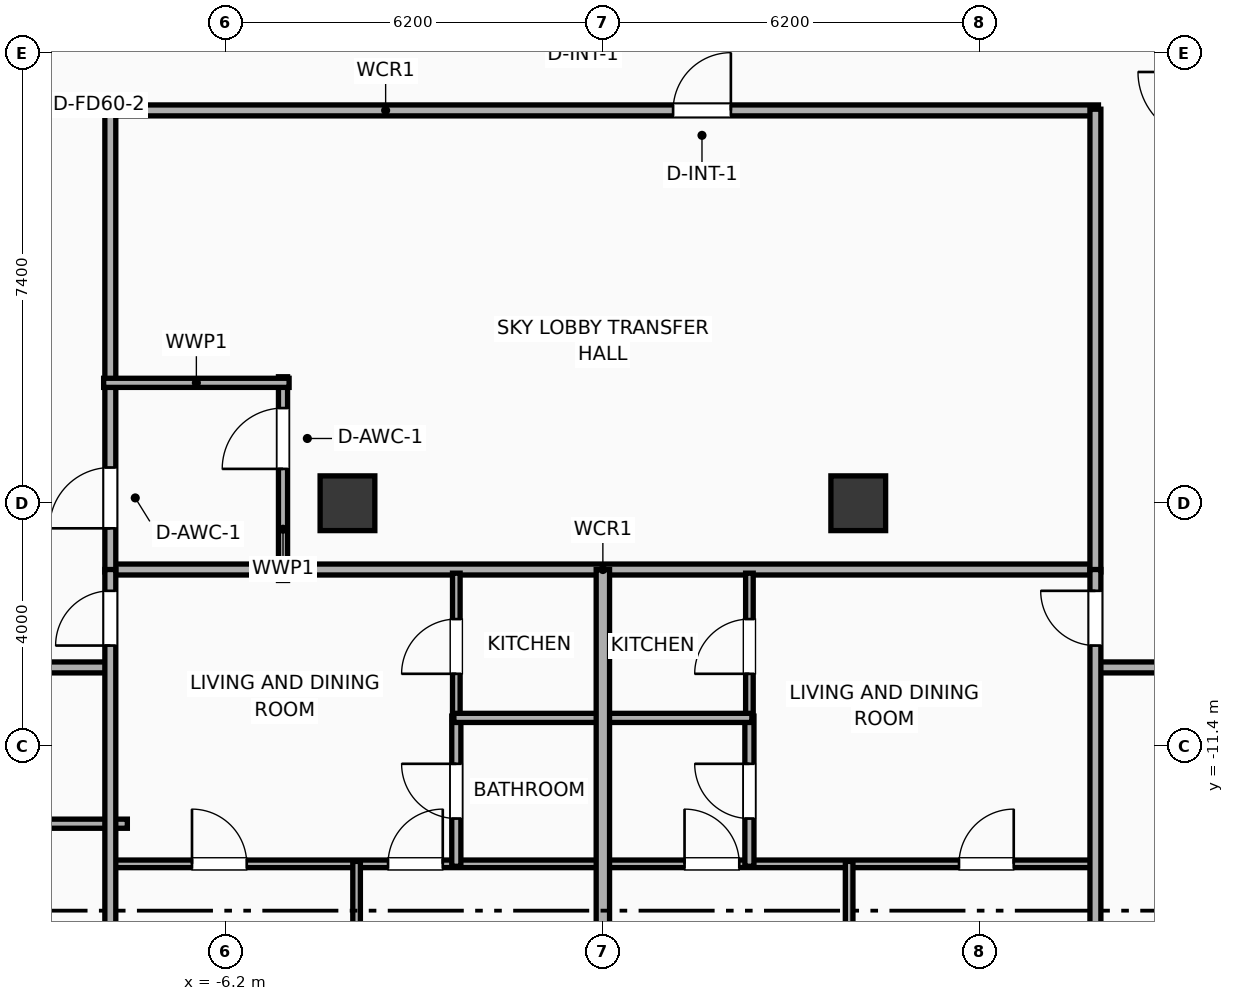
"""IFC4 building model, lengths in metres.
Left out: names, types, materials, properties, quantities, classifications, styles, units other than length and angle.
Written with IfcOpenShell. Run it as: python <this file> out.ifc"""

import sys

from ifc_helpers import new_model, si_unit, direction, frame, frame_2d, origin, origin_2d, place, context, subcontext, project, spatial, rectangle, extrude, element, fill, save


model = new_model("IFC4")
c1 = context("Model", 3, precision=1e-05, world=origin(), true_north=direction((0.0, 1.0)))
c2 = subcontext(c1, "Body", "Model", "MODEL_VIEW")
j1 = project(units=[si_unit("LENGTHUNIT", "METRE"), si_unit("PLANEANGLEUNIT", "RADIAN")], contexts=[c1])
p1 = place(None, origin())
s1 = spatial("IfcSite", under=j1, at=p1, CompositionType="ELEMENT")
p2 = place(p1, origin())
s2 = spatial("IfcBuilding", under=s1, at=p2, CompositionType="ELEMENT")
p3 = place(p2, frame((0.0, 0.0, 200.2)))
s3 = spatial("IfcBuildingStorey", under=s2, at=p3, CompositionType="ELEMENT", Elevation=200.2)
for number, where, z_axis, x_axis in (
    (1, (-4.2, -7.4, 0.0), (0.0, 0.0, 1.0), (1.0, 0.0, 0.0)),
    (2, (4.2, -7.4, 0.0), (0.0, 0.0, 1.0), (1.0, 0.0, 0.0)),
):
    element("IfcColumn", number, at=place(p3, frame(where, z_axis=z_axis, x_axis=x_axis)), inside=s3, PredefinedType="COLUMN", context=c2, shape_type="SweptSolid", body=[
        extrude(rectangle(XDim=0.9, YDim=0.9, at=origin_2d()), origin(), (0.0, 0.0, 1.0), 3.9),
    ])
p4 = place(p3, frame((-8.15, -8.49, 0.0), z_axis=(0.0, 0.0, 1.0), x_axis=(1.0, 0.0, 0.0)))
e3 = element("IfcWall", 3, at=p4, inside=s3, PredefinedType="PARTITIONING", context=c2, shape_type="SweptSolid", body=[
    extrude(rectangle(XDim=16.3, YDim=0.18, at=frame_2d((8.15, 0.0))), origin(), (0.0, 0.0, 1.0), 3.65),
])
p5 = place(p3, frame((-8.15, -0.94, 0.0), z_axis=(0.0, 0.0, 1.0), x_axis=(1.0, 0.0, 0.0)))
e4 = element("IfcWall", 4, at=p5, inside=s3, PredefinedType="PARTITIONING", context=c2, shape_type="SweptSolid", body=[
    extrude(rectangle(XDim=16.3, YDim=0.18, at=frame_2d((8.15, 0.0))), origin(), (0.0, 0.0, 1.0), 3.65),
])
p6 = place(p5, frame((9.305, 0.0, 0.0)))
e5 = element("IfcOpeningElement", 5, at=p6, cuts=e4, PredefinedType="OPENING", context=c2, shape_type="SweptSolid", body=[
    extrude(rectangle(XDim=0.95, YDim=2.05, at=frame_2d((0.475, 1.025))), frame((0.0, 0.1, 0.0), z_axis=(0.0, -1.0, 0.0), x_axis=(1.0, 0.0, 0.0)), (0.0, 0.0, 1.0), 0.2),
])
p7 = place(p3, frame((-8.1, -8.53, 0.0), z_axis=(0.0, 0.0, 1.0), x_axis=(0.0, 1.0, 0.0)))
e6 = element("IfcWall", 6, at=p7, inside=s3, PredefinedType="PARTITIONING", context=c2, shape_type="SweptSolid", body=[
    extrude(rectangle(XDim=7.61, YDim=0.18, at=frame_2d((3.805, 0.0))), origin(), (0.0, 0.0, 1.0), 3.65),
])
p8 = place(p7, frame((0.718, 0.0, 0.0)))
e7 = element("IfcOpeningElement", 7, at=p8, cuts=e6, PredefinedType="OPENING", context=c2, shape_type="SweptSolid", body=[
    extrude(rectangle(XDim=1.0, YDim=2.05, at=frame_2d((0.5, 1.025))), frame((0.0, 0.1, 0.0), z_axis=(0.0, -1.0, 0.0), x_axis=(1.0, 0.0, 0.0)), (0.0, 0.0, 1.0), 0.2),
])
p9 = place(p3, frame((8.1, -8.53, 0.0), z_axis=(0.0, 0.0, 1.0), x_axis=(0.0, 1.0, 0.0)))
e8 = element("IfcWall", 8, at=p9, inside=s3, PredefinedType="PARTITIONING", context=c2, shape_type="SweptSolid", body=[
    extrude(rectangle(XDim=7.61, YDim=0.18, at=frame_2d((3.805, 0.0))), origin(), (0.0, 0.0, 1.0), 3.65),
])
p10 = place(p3, frame((-5.26, -8.67, 0.0), z_axis=(0.0, 0.0, 1.0), x_axis=(0.0, 1.0, 0.0)))
e9 = element("IfcWall", 9, at=p10, inside=s3, PredefinedType="PLUMBINGWALL", context=c2, shape_type="SweptSolid", body=[
    extrude(rectangle(XDim=3.35, YDim=0.15, at=frame_2d((1.675, 0.0))), origin(), (0.0, 0.0, 1.0), 3.65),
])
p11 = place(p10, frame((1.835, 0.0, 0.0)))
e10 = element("IfcOpeningElement", 10, at=p11, cuts=e9, PredefinedType="OPENING", context=c2, shape_type="SweptSolid", body=[
    extrude(rectangle(XDim=1.0, YDim=2.05, at=frame_2d((0.5, 1.025))), frame((0.0, 0.085, 0.0), z_axis=(0.0, -1.0, 0.0), x_axis=(1.0, 0.0, 0.0)), (0.0, 0.0, 1.0), 0.17),
])
p12 = place(p3, frame((-8.21, -5.42, 0.0), z_axis=(0.0, 0.0, 1.0), x_axis=(1.0, 0.0, 0.0)))
e11 = element("IfcWall", 11, at=p12, inside=s3, PredefinedType="PLUMBINGWALL", context=c2, shape_type="SweptSolid", body=[
    extrude(rectangle(XDim=3.05, YDim=0.15, at=frame_2d((1.525, 0.0))), origin(), (0.0, 0.0, 1.0), 3.65),
])
p13 = place(p3, frame((-10.084, -12.67, 0.0), z_axis=(0.0, 0.0, 1.0), x_axis=(1.0, 0.0, 0.0)))
e12 = element("IfcWall", 12, at=p13, inside=s3, PredefinedType="PLUMBINGWALL", context=c2, shape_type="SweptSolid", body=[
    extrude(rectangle(XDim=2.264, YDim=0.15, at=frame_2d((1.132, 0.0))), origin(), (0.0, 0.0, 1.0), 3.65),
])
p14 = place(p3, frame((-19.5, -10.1, 0.0), z_axis=(0.0, 0.0, 1.0), x_axis=(1.0, 0.0, 0.0)))
e13 = element("IfcWall", 13, at=p14, inside=s3, PredefinedType="PARTITIONING", context=c2, shape_type="SweptSolid", body=[
    extrude(rectangle(XDim=11.42, YDim=0.18, at=frame_2d((5.71, 0.0))), origin(), (0.0, 0.0, 1.0), 3.65),
])
p15 = place(p14, frame((2.324, 0.0, 0.0)))
e14 = element("IfcOpeningElement", 14, at=p15, cuts=e13, PredefinedType="OPENING", context=c2, shape_type="SweptSolid", body=[
    extrude(rectangle(XDim=1.15, YDim=2.05, at=frame_2d((0.575, 1.025))), frame((0.0, 0.1, 0.0), z_axis=(0.0, -1.0, 0.0), x_axis=(1.0, 0.0, 0.0)), (0.0, 0.0, 1.0), 0.2),
])
p16 = place(p14, frame((8.323, 0.0, 0.0)))
e15 = element("IfcOpeningElement", 15, at=p16, cuts=e13, PredefinedType="OPENING", context=c2, shape_type="SweptSolid", body=[
    extrude(rectangle(XDim=0.9, YDim=2.05, at=frame_2d((0.45, 1.025))), frame((0.0, 0.1, 0.0), z_axis=(0.0, -1.0, 0.0), x_axis=(1.0, 0.0, 0.0)), (0.0, 0.0, 1.0), 0.2),
])
p17 = place(p3, frame((8.08, -10.1, 0.0), z_axis=(0.0, 0.0, 1.0), x_axis=(1.0, 0.0, 0.0)))
e16 = element("IfcWall", 16, at=p17, inside=s3, PredefinedType="PARTITIONING", context=c2, shape_type="SweptSolid", body=[
    extrude(rectangle(XDim=11.42, YDim=0.18, at=frame_2d((5.71, 0.0))), origin(), (0.0, 0.0, 1.0), 3.65),
])
p18 = place(p17, frame((1.175, 0.0, 0.0)))
e17 = element("IfcOpeningElement", 17, at=p18, cuts=e16, PredefinedType="OPENING", context=c2, shape_type="SweptSolid", body=[
    extrude(rectangle(XDim=1.15, YDim=2.05, at=frame_2d((0.575, 1.025))), frame((0.0, 0.1, 0.0), z_axis=(0.0, -1.0, 0.0), x_axis=(1.0, 0.0, 0.0)), (0.0, 0.0, 1.0), 0.2),
])
p19 = place(p17, frame((8.243, 0.0, 0.0)))
e18 = element("IfcOpeningElement", 18, at=p19, cuts=e16, PredefinedType="OPENING", context=c2, shape_type="SweptSolid", body=[
    extrude(rectangle(XDim=0.9, YDim=2.05, at=frame_2d((0.45, 1.025))), frame((0.0, 0.1, 0.0), z_axis=(0.0, -1.0, 0.0), x_axis=(1.0, 0.0, 0.0)), (0.0, 0.0, 1.0), 0.2),
])
p20 = place(p3, frame((-8.08, -13.33, 0.0), z_axis=(0.0, 0.0, 1.0), x_axis=(1.0, 0.0, 0.0)))
e19 = element("IfcWall", 19, at=p20, inside=s3, PredefinedType="PARTITIONING", context=c2, shape_type="SweptSolid", body=[
    extrude(rectangle(XDim=8.06, YDim=0.125, at=frame_2d((4.03, 0.0))), origin(), (0.0, 0.0, 1.0), 3.65),
])
p21 = place(p20, frame((1.323, 0.0, 0.0)))
e20 = element("IfcOpeningElement", 20, at=p21, cuts=e19, PredefinedType="OPENING", context=c2, shape_type="SweptSolid", body=[
    extrude(rectangle(XDim=0.9, YDim=2.05, at=frame_2d((0.45, 1.025))), frame((0.0, 0.073, 0.0), z_axis=(0.0, -1.0, 0.0), x_axis=(1.0, 0.0, 0.0)), (0.0, 0.0, 1.0), 0.145),
])
p22 = place(p20, frame((4.547, 0.0, 0.0)))
e21 = element("IfcOpeningElement", 21, at=p22, cuts=e19, PredefinedType="OPENING", context=c2, shape_type="SweptSolid", body=[
    extrude(rectangle(XDim=0.9, YDim=2.05, at=frame_2d((0.45, 1.025))), frame((0.0, 0.073, 0.0), z_axis=(0.0, -1.0, 0.0), x_axis=(1.0, 0.0, 0.0)), (0.0, 0.0, 1.0), 0.145),
])
p23 = place(p3, frame((-2.41, -10.96, 0.0), z_axis=(0.0, 0.0, 1.0), x_axis=(0.0, 1.0, 0.0)))
e22 = element("IfcWall", 22, at=p23, inside=s3, PredefinedType="PARTITIONING", context=c2, shape_type="SweptSolid", body=[
    extrude(rectangle(XDim=2.41, YDim=0.125, at=frame_2d((1.205, 0.0))), origin(), (0.0, 0.0, 1.0), 3.65),
])
p24 = place(p23, frame((0.755, 0.0, 0.0)))
e23 = element("IfcOpeningElement", 23, at=p24, cuts=e22, PredefinedType="OPENING", context=c2, shape_type="SweptSolid", body=[
    extrude(rectangle(XDim=0.9, YDim=2.05, at=frame_2d((0.45, 1.025))), frame((0.0, 0.073, 0.0), z_axis=(0.0, -1.0, 0.0), x_axis=(1.0, 0.0, 0.0)), (0.0, 0.0, 1.0), 0.145),
])
p25 = place(p3, frame((-2.41, -13.37, 0.0), z_axis=(0.0, 0.0, 1.0), x_axis=(0.0, 1.0, 0.0)))
e24 = element("IfcWall", 24, at=p25, inside=s3, PredefinedType="PLUMBINGWALL", context=c2, shape_type="SweptSolid", body=[
    extrude(rectangle(XDim=2.47, YDim=0.15, at=frame_2d((1.235, 0.0))), origin(), (0.0, 0.0, 1.0), 3.65),
])
p26 = place(p25, frame((0.785, 0.0, 0.0)))
e25 = element("IfcOpeningElement", 25, at=p26, cuts=e24, PredefinedType="OPENING", context=c2, shape_type="SweptSolid", body=[
    extrude(rectangle(XDim=0.9, YDim=2.05, at=frame_2d((0.45, 1.025))), frame((0.0, 0.085, 0.0), z_axis=(0.0, -1.0, 0.0), x_axis=(1.0, 0.0, 0.0)), (0.0, 0.0, 1.0), 0.17),
])
p27 = place(p3, frame((-2.45, -10.93, 0.0), z_axis=(0.0, 0.0, 1.0), x_axis=(1.0, 0.0, 0.0)))
e26 = element("IfcWall", 26, at=p27, inside=s3, PredefinedType="PLUMBINGWALL", context=c2, shape_type="SweptSolid", body=[
    extrude(rectangle(XDim=2.43, YDim=0.15, at=frame_2d((1.215, 0.0))), origin(), (0.0, 0.0, 1.0), 3.65),
])
p28 = place(p3, frame((-4.05, -18.83, 0.0), z_axis=(0.0, 0.0, 1.0), x_axis=(0.0, 1.0, 0.0)))
e27 = element("IfcWall", 27, at=p28, inside=s3, PredefinedType="PARTITIONING", context=c2, shape_type="SweptSolid", body=[
    extrude(rectangle(XDim=5.54, YDim=0.125, at=frame_2d((2.77, 0.0))), origin(), (0.0, 0.0, 1.0), 2.54),
])
p29 = place(p3, frame((-8.1, -18.83, 0.0), z_axis=(0.0, 0.0, 1.0), x_axis=(0.0, 1.0, 0.0)))
e28 = element("IfcWall", 28, at=p29, inside=s3, PredefinedType="PARTITIONING", context=c2, shape_type="SweptSolid", body=[
    extrude(rectangle(XDim=10.34, YDim=0.18, at=frame_2d((5.17, 0.0))), origin(), (0.0, 0.0, 1.0), 3.65),
])
p30 = place(p29, frame((9.09, 0.0, 0.0)))
e29 = element("IfcOpeningElement", 29, at=p30, cuts=e28, PredefinedType="OPENING", context=c2, shape_type="SweptSolid", body=[
    extrude(rectangle(XDim=0.9, YDim=2.05, at=frame_2d((0.45, 1.025))), frame((0.0, 0.1, 0.0), z_axis=(0.0, -1.0, 0.0), x_axis=(1.0, 0.0, 0.0)), (0.0, 0.0, 1.0), 0.2),
])
p31 = place(p3, frame((0.02, -13.33, 0.0), z_axis=(0.0, 0.0, 1.0), x_axis=(1.0, 0.0, 0.0)))
e30 = element("IfcWall", 30, at=p31, inside=s3, PredefinedType="PARTITIONING", context=c2, shape_type="SweptSolid", body=[
    extrude(rectangle(XDim=8.06, YDim=0.125, at=frame_2d((4.03, 0.0))), origin(), (0.0, 0.0, 1.0), 3.65),
])
p32 = place(p31, frame((1.323, 0.0, 0.0)))
e31 = element("IfcOpeningElement", 31, at=p32, cuts=e30, PredefinedType="OPENING", context=c2, shape_type="SweptSolid", body=[
    extrude(rectangle(XDim=0.9, YDim=2.05, at=frame_2d((0.45, 1.025))), frame((0.0, 0.073, 0.0), z_axis=(0.0, -1.0, 0.0), x_axis=(1.0, 0.0, 0.0)), (0.0, 0.0, 1.0), 0.145),
])
p33 = place(p31, frame((5.837, 0.0, 0.0)))
e32 = element("IfcOpeningElement", 32, at=p33, cuts=e30, PredefinedType="OPENING", context=c2, shape_type="SweptSolid", body=[
    extrude(rectangle(XDim=0.9, YDim=2.05, at=frame_2d((0.45, 1.025))), frame((0.0, 0.073, 0.0), z_axis=(0.0, -1.0, 0.0), x_axis=(1.0, 0.0, 0.0)), (0.0, 0.0, 1.0), 0.145),
])
p34 = place(p3, frame((2.41, -10.96, 0.0), z_axis=(0.0, 0.0, 1.0), x_axis=(0.0, 1.0, 0.0)))
e33 = element("IfcWall", 33, at=p34, inside=s3, PredefinedType="PARTITIONING", context=c2, shape_type="SweptSolid", body=[
    extrude(rectangle(XDim=2.41, YDim=0.125, at=frame_2d((1.205, 0.0))), origin(), (0.0, 0.0, 1.0), 3.65),
])
p35 = place(p34, frame((0.755, 0.0, 0.0)))
e34 = element("IfcOpeningElement", 34, at=p35, cuts=e33, PredefinedType="OPENING", context=c2, shape_type="SweptSolid", body=[
    extrude(rectangle(XDim=0.9, YDim=2.05, at=frame_2d((0.45, 1.025))), frame((0.0, 0.073, 0.0), z_axis=(0.0, -1.0, 0.0), x_axis=(1.0, 0.0, 0.0)), (0.0, 0.0, 1.0), 0.145),
])
p36 = place(p3, frame((2.41, -13.37, 0.0), z_axis=(0.0, 0.0, 1.0), x_axis=(0.0, 1.0, 0.0)))
e35 = element("IfcWall", 35, at=p36, inside=s3, PredefinedType="PLUMBINGWALL", context=c2, shape_type="SweptSolid", body=[
    extrude(rectangle(XDim=2.47, YDim=0.15, at=frame_2d((1.235, 0.0))), origin(), (0.0, 0.0, 1.0), 3.65),
])
p37 = place(p36, frame((0.785, 0.0, 0.0)))
e36 = element("IfcOpeningElement", 36, at=p37, cuts=e35, PredefinedType="OPENING", context=c2, shape_type="SweptSolid", body=[
    extrude(rectangle(XDim=0.9, YDim=2.05, at=frame_2d((0.45, 1.025))), frame((0.0, 0.085, 0.0), z_axis=(0.0, -1.0, 0.0), x_axis=(1.0, 0.0, 0.0)), (0.0, 0.0, 1.0), 0.17),
])
p38 = place(p3, frame((0.02, -10.93, 0.0), z_axis=(0.0, 0.0, 1.0), x_axis=(1.0, 0.0, 0.0)))
e37 = element("IfcWall", 37, at=p38, inside=s3, PredefinedType="PLUMBINGWALL", context=c2, shape_type="SweptSolid", body=[
    extrude(rectangle(XDim=2.43, YDim=0.15, at=frame_2d((1.215, 0.0))), origin(), (0.0, 0.0, 1.0), 3.65),
])
p39 = place(p3, frame((4.05, -18.83, 0.0), z_axis=(0.0, 0.0, 1.0), x_axis=(0.0, 1.0, 0.0)))
e38 = element("IfcWall", 38, at=p39, inside=s3, PredefinedType="PARTITIONING", context=c2, shape_type="SweptSolid", body=[
    extrude(rectangle(XDim=5.54, YDim=0.125, at=frame_2d((2.77, 0.0))), origin(), (0.0, 0.0, 1.0), 3.65),
])
p40 = place(p3, frame((8.1, -18.83, 0.0), z_axis=(0.0, 0.0, 1.0), x_axis=(0.0, 1.0, 0.0)))
e39 = element("IfcWall", 39, at=p40, inside=s3, PredefinedType="PARTITIONING", context=c2, shape_type="SweptSolid", body=[
    extrude(rectangle(XDim=10.34, YDim=0.18, at=frame_2d((5.17, 0.0))), origin(), (0.0, 0.0, 1.0), 3.65),
])
p41 = place(p40, frame((9.09, 0.0, 0.0)))
e40 = element("IfcOpeningElement", 40, at=p41, cuts=e39, PredefinedType="OPENING", context=c2, shape_type="SweptSolid", body=[
    extrude(rectangle(XDim=0.9, YDim=2.05, at=frame_2d((0.45, 1.025))), frame((0.0, 0.1, 0.0), z_axis=(0.0, -1.0, 0.0), x_axis=(1.0, 0.0, 0.0)), (0.0, 0.0, 1.0), 0.2),
])
p42 = place(p3, frame((0.0, -18.83, 0.0), z_axis=(0.0, 0.0, 1.0), x_axis=(0.0, 1.0, 0.0)))
e41 = element("IfcWall", 41, at=p42, inside=s3, PredefinedType="PARTITIONING", context=c2, shape_type="SweptSolid", body=[
    extrude(rectangle(XDim=10.34, YDim=0.22, at=frame_2d((5.17, 0.0))), origin(), (0.0, 0.0, 1.0), 3.65),
])
p43 = place(p6, origin())
e42 = element("IfcDoor", 42, at=p43, inside=s3, OperationType="SINGLE_SWING_RIGHT", PredefinedType="DOOR", context=c2, shape_type="SweptSolid", body=[
    extrude(rectangle(XDim=0.95, YDim=2.05, at=frame_2d((0.475, 1.025))), frame((0.0, 0.025, 0.0), z_axis=(0.0, -1.0, 0.0), x_axis=(1.0, 0.0, 0.0)), (0.0, 0.0, 1.0), 0.05),
])
fill(e5, e42)
p44 = place(p8, origin())
e43 = element("IfcDoor", 43, at=p44, inside=s3, OperationType="SINGLE_SWING_LEFT", PredefinedType="DOOR", context=c2, shape_type="SweptSolid", body=[
    extrude(rectangle(XDim=1.0, YDim=2.05, at=frame_2d((0.5, 1.025))), frame((0.0, 0.025, 0.0), z_axis=(0.0, -1.0, 0.0), x_axis=(1.0, 0.0, 0.0)), (0.0, 0.0, 1.0), 0.05),
])
fill(e7, e43)
p45 = place(p11, origin())
e44 = element("IfcDoor", 44, at=p45, inside=s3, OperationType="SINGLE_SWING_LEFT", PredefinedType="DOOR", context=c2, shape_type="SweptSolid", body=[
    extrude(rectangle(XDim=1.0, YDim=2.05, at=frame_2d((0.5, 1.025))), frame((0.0, 0.025, 0.0), z_axis=(0.0, -1.0, 0.0), x_axis=(1.0, 0.0, 0.0)), (0.0, 0.0, 1.0), 0.05),
])
fill(e10, e44)
p46 = place(p21, origin())
e45 = element("IfcDoor", 45, at=p46, inside=s3, OperationType="SINGLE_SWING_LEFT", PredefinedType="DOOR", context=c2, shape_type="SweptSolid", body=[
    extrude(rectangle(XDim=0.9, YDim=2.05, at=frame_2d((0.45, 1.025))), frame((0.0, 0.025, 0.0), z_axis=(0.0, -1.0, 0.0), x_axis=(1.0, 0.0, 0.0)), (0.0, 0.0, 1.0), 0.05),
])
fill(e20, e45)
p47 = place(p22, origin())
e46 = element("IfcDoor", 46, at=p47, inside=s3, OperationType="SINGLE_SWING_RIGHT", PredefinedType="DOOR", context=c2, shape_type="SweptSolid", body=[
    extrude(rectangle(XDim=0.9, YDim=2.05, at=frame_2d((0.45, 1.025))), frame((0.0, 0.025, 0.0), z_axis=(0.0, -1.0, 0.0), x_axis=(1.0, 0.0, 0.0)), (0.0, 0.0, 1.0), 0.05),
])
fill(e21, e46)
p48 = place(p24, origin())
e47 = element("IfcDoor", 47, at=p48, inside=s3, OperationType="SINGLE_SWING_LEFT", PredefinedType="DOOR", context=c2, shape_type="SweptSolid", body=[
    extrude(rectangle(XDim=0.9, YDim=2.05, at=frame_2d((0.45, 1.025))), frame((0.0, 0.025, 0.0), z_axis=(0.0, -1.0, 0.0), x_axis=(1.0, 0.0, 0.0)), (0.0, 0.0, 1.0), 0.05),
])
fill(e23, e47)
p49 = place(p26, origin())
e48 = element("IfcDoor", 48, at=p49, inside=s3, OperationType="SINGLE_SWING_RIGHT", PredefinedType="DOOR", context=c2, shape_type="SweptSolid", body=[
    extrude(rectangle(XDim=0.9, YDim=2.05, at=frame_2d((0.45, 1.025))), frame((0.0, 0.025, 0.0), z_axis=(0.0, -1.0, 0.0), x_axis=(1.0, 0.0, 0.0)), (0.0, 0.0, 1.0), 0.05),
])
fill(e25, e48)
p50 = place(p30, origin())
e49 = element("IfcDoor", 49, at=p50, inside=s3, OperationType="SINGLE_SWING_LEFT", PredefinedType="DOOR", context=c2, shape_type="SweptSolid", body=[
    extrude(rectangle(XDim=0.9, YDim=2.05, at=frame_2d((0.45, 1.025))), frame((0.0, 0.025, 0.0), z_axis=(0.0, -1.0, 0.0), x_axis=(1.0, 0.0, 0.0)), (0.0, 0.0, 1.0), 0.05),
])
fill(e29, e49)
p51 = place(p32, origin())
e50 = element("IfcDoor", 50, at=p51, inside=s3, OperationType="SINGLE_SWING_LEFT", PredefinedType="DOOR", context=c2, shape_type="SweptSolid", body=[
    extrude(rectangle(XDim=0.9, YDim=2.05, at=frame_2d((0.45, 1.025))), frame((0.0, 0.025, 0.0), z_axis=(0.0, -1.0, 0.0), x_axis=(1.0, 0.0, 0.0)), (0.0, 0.0, 1.0), 0.05),
])
fill(e31, e50)
p52 = place(p33, origin())
e51 = element("IfcDoor", 51, at=p52, inside=s3, OperationType="SINGLE_SWING_RIGHT", PredefinedType="DOOR", context=c2, shape_type="SweptSolid", body=[
    extrude(rectangle(XDim=0.9, YDim=2.05, at=frame_2d((0.45, 1.025))), frame((0.0, 0.025, 0.0), z_axis=(0.0, -1.0, 0.0), x_axis=(1.0, 0.0, 0.0)), (0.0, 0.0, 1.0), 0.05),
])
fill(e32, e51)
p53 = place(p35, origin())
e52 = element("IfcDoor", 52, at=p53, inside=s3, OperationType="SINGLE_SWING_LEFT", PredefinedType="DOOR", context=c2, shape_type="SweptSolid", body=[
    extrude(rectangle(XDim=0.9, YDim=2.05, at=frame_2d((0.45, 1.025))), frame((0.0, 0.025, 0.0), z_axis=(0.0, -1.0, 0.0), x_axis=(1.0, 0.0, 0.0)), (0.0, 0.0, 1.0), 0.05),
])
fill(e34, e52)
p54 = place(p37, origin())
e53 = element("IfcDoor", 53, at=p54, inside=s3, OperationType="SINGLE_SWING_RIGHT", PredefinedType="DOOR", context=c2, shape_type="SweptSolid", body=[
    extrude(rectangle(XDim=0.9, YDim=2.05, at=frame_2d((0.45, 1.025))), frame((0.0, 0.025, 0.0), z_axis=(0.0, -1.0, 0.0), x_axis=(1.0, 0.0, 0.0)), (0.0, 0.0, 1.0), 0.05),
])
fill(e36, e53)
p55 = place(p41, origin())
e54 = element("IfcDoor", 54, at=p55, inside=s3, OperationType="SINGLE_SWING_RIGHT", PredefinedType="DOOR", context=c2, shape_type="SweptSolid", body=[
    extrude(rectangle(XDim=0.9, YDim=2.05, at=frame_2d((0.45, 1.025))), frame((0.0, 0.025, 0.0), z_axis=(0.0, -1.0, 0.0), x_axis=(1.0, 0.0, 0.0)), (0.0, 0.0, 1.0), 0.05),
])
fill(e40, e54)
save(model, sys.argv[1])
